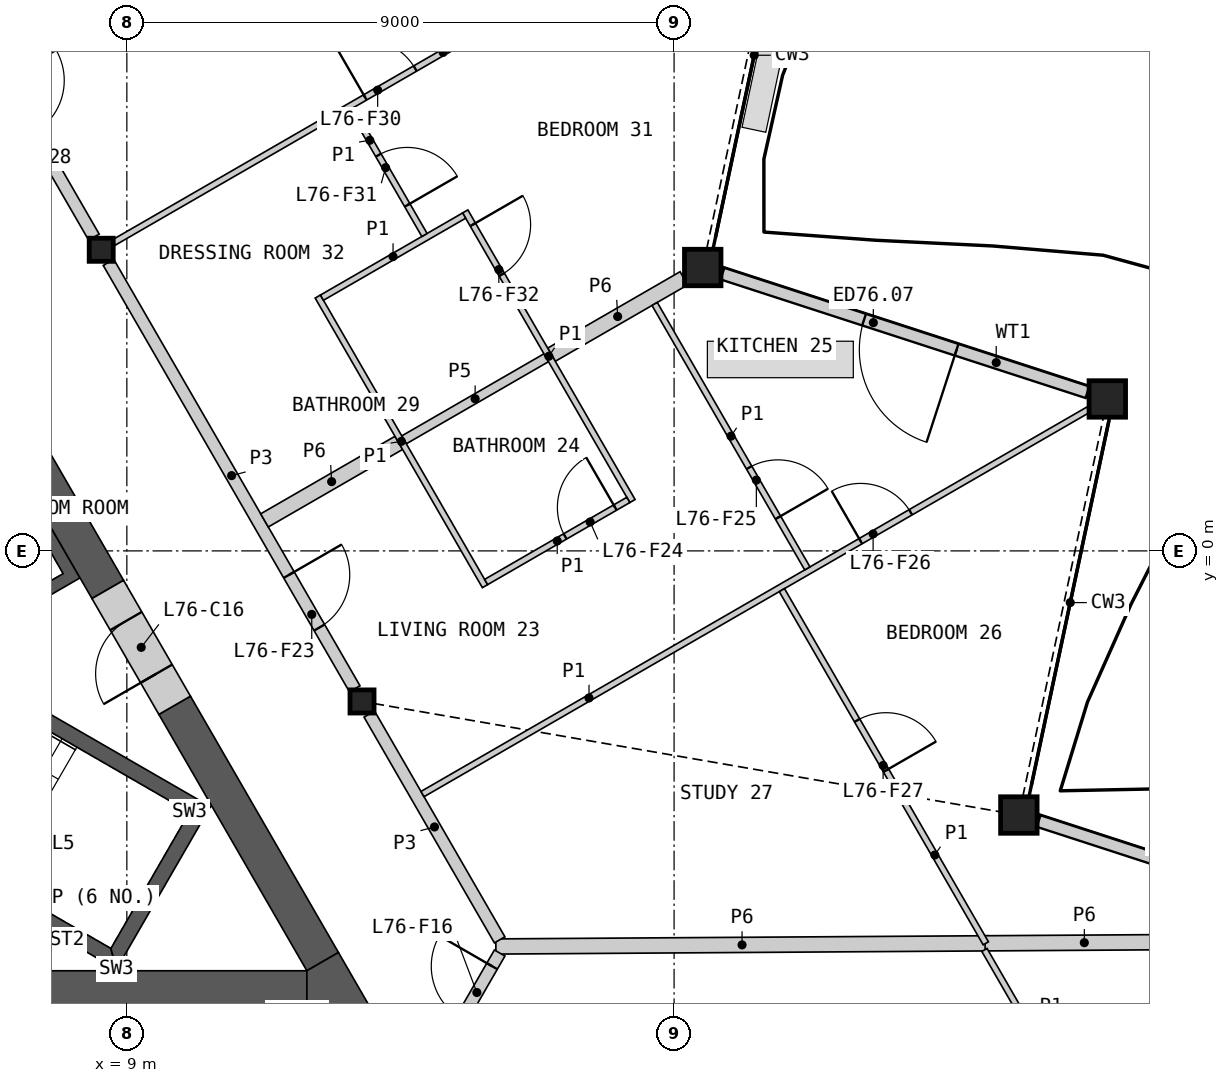
"""IFC4 building model, lengths in metres.
Left out: names, types, materials, properties, quantities, classifications, styles, units other than length and angle.
Written with IfcOpenShell. Run it as: python <this file> out.ifc"""

import sys

from ifc_helpers import new_model, si_unit, direction, frame, frame_2d, origin, origin_2d, place, context, subcontext, project, spatial, polyline, rectangle, hollow_rectangle, i_section, outline, extrude, element, fill, save


model = new_model("IFC4")
c1 = context("Model", 3, precision=1e-05, world=origin(), true_north=direction((0.0, 1.0)))
c2 = subcontext(c1, "Body", "Model", "MODEL_VIEW")
j1 = project(units=[si_unit("LENGTHUNIT", "METRE"), si_unit("PLANEANGLEUNIT", "RADIAN")], contexts=[c1])
p1 = place(None, origin())
s1 = spatial("IfcSite", under=j1, at=p1, CompositionType="ELEMENT")
p2 = place(p1, origin())
s2 = spatial("IfcBuilding", under=s1, at=p2, CompositionType="ELEMENT")
p3 = place(p2, frame((0.0, 0.0, 339.2)))
s3 = spatial("IfcBuildingStorey", under=s2, at=p3, CompositionType="ELEMENT", Elevation=339.2)
for number, where, z_axis, x_axis in (
    (1, (23.67, -4.344, 0.0), (0.0, 0.0, 1.0), (1.0, 0.0, 0.0)),
    (2, (25.125, 2.499, 0.0), (0.0, 0.0, 1.0), (1.0, 0.0, 0.0)),
    (3, (18.471, 4.661, 0.0), (0.0, 0.0, 1.0), (1.0, 0.0, 0.0)),
):
    element("IfcColumn", number, at=place(p3, frame(where, z_axis=z_axis, x_axis=x_axis)), inside=s3, PredefinedType="COLUMN", context=c2, shape_type="SweptSolid", body=[
        extrude(hollow_rectangle(XDim=0.6, YDim=0.6, WallThickness=0.04, at=origin_2d()), origin(), (0.0, 0.0, 1.0), 3.4),
    ])
for number, where, z_axis, x_axis in (
    (4, (12.868, -2.476, 0.0), (0.0, 0.0, 1.0), (1.0, 0.0, 0.0)),
    (5, (8.578, 4.953, 0.0), (0.0, 0.0, 1.0), (1.0, 0.0, 0.0)),
):
    element("IfcColumn", number, at=place(p3, frame(where, z_axis=z_axis, x_axis=x_axis)), inside=s3, PredefinedType="COLUMN", context=c2, shape_type="SweptSolid", body=[
        extrude(i_section(OverallWidth=0.396, OverallDepth=0.381, WebThickness=0.019, FlangeThickness=0.03, at=origin_2d()), origin(), (0.0, 0.0, 1.0), 3.4),
    ])
p4 = place(p3, frame((29.996, -6.393, 0.0), z_axis=(0.0, 0.0, 1.0), x_axis=(-0.951051127664, 0.309033578383, 0.0)))
e6 = element("IfcWall", 6, at=p4, inside=s3, PredefinedType="SOLIDWALL", context=c2, shape_type="SweptSolid", body=[
    extrude(rectangle(XDim=6.31, YDim=0.2, at=frame_2d((3.155, 0.0))), origin(), (0.0, 0.0, 1.0), 2.488),
])
p5 = place(p4, frame((2.263, 0.0, 0.0)))
e7 = element("IfcOpeningElement", 7, at=p5, cuts=e6, PredefinedType="OPENING", context=c2, shape_type="SweptSolid", body=[
    extrude(rectangle(XDim=1.6, YDim=2.25, at=frame_2d((0.8, 1.125))), frame((0.0, 0.11, 0.0), z_axis=(0.0, -1.0, 0.0), x_axis=(1.0, 0.0, 0.0)), (0.0, 0.0, 1.0), 0.22),
])
p6 = place(p3, frame((24.798, 2.609, 0.0), z_axis=(0.0, 0.0, 1.0), x_axis=(-0.951065616977, 0.308988983952, 0.0)))
e8 = element("IfcWall", 8, at=p6, inside=s3, PredefinedType="SOLIDWALL", context=c2, shape_type="SweptSolid", body=[
    extrude(rectangle(XDim=6.312, YDim=0.2, at=frame_2d((3.156, 0.0))), origin(), (0.0, 0.0, 1.0), 2.488),
])
p7 = place(p6, frame((2.263, 0.0, 0.0)))
e9 = element("IfcOpeningElement", 9, at=p7, cuts=e8, PredefinedType="OPENING", context=c2, shape_type="SweptSolid", body=[
    extrude(rectangle(XDim=1.6, YDim=2.25, at=frame_2d((0.8, 1.125))), frame((0.0, 0.11, 0.0), z_axis=(0.0, -1.0, 0.0), x_axis=(1.0, 0.0, 0.0)), (0.0, 0.0, 1.0), 0.22),
])
p8 = place(p3, origin())
e10 = element("IfcWall", 10, at=p8, inside=s3, PredefinedType="SHEAR", context=c2, shape_type="SweptSolid", body=[
    extrude(outline(polyline([(1.561, 6.097), (3.731, 7.35), (8.231, -0.444), (6.061, -1.697), (5.96, -1.524), (7.952, -0.374), (6.952, 1.358), (4.96, 0.208), (4.861, 0.381), (6.852, 1.531), (5.852, 3.263), (3.861, 2.113), (3.76, 2.287), (5.752, 3.437), (4.752, 5.169), (2.76, 4.019), (2.66, 4.192), (4.652, 5.342), (3.652, 7.074), (1.66, 5.924), (1.561, 6.097)])), origin(), (0.0, 0.0, 1.0), 3.1),
])
p9 = place(p3, origin())
e11 = element("IfcWall", 11, at=p9, inside=s3, PredefinedType="SHEAR", context=c2, shape_type="SweptSolid", body=[
    extrude(outline(polyline([(3.763, -3.956), (8.83, -6.881), (8.738, -6.539), (3.888, -3.739), (3.763, -3.956)])), origin(), (0.0, 0.0, 1.0), 3.1),
])
p10 = place(p3, origin())
e12 = element("IfcWall", 12, at=p10, inside=s3, PredefinedType="SHEAR", context=c2, shape_type="SweptSolid", body=[
    extrude(outline(polyline([(8.83, -6.881), (10.374, -4.206), (10.032, -4.298), (8.738, -6.539), (8.83, -6.881)])), origin(), (0.0, 0.0, 1.0), 3.1),
])
p11 = place(p3, origin())
e13 = element("IfcWall", 13, at=p11, inside=s3, PredefinedType="SHEAR", context=c2, shape_type="SweptSolid", body=[
    extrude(outline(polyline([(10.032, -4.298), (10.374, -4.206), (5.307, -1.281), (5.182, -1.498), (10.032, -4.298)])), origin(), (0.0, 0.0, 1.0), 3.1),
])
p12 = place(p3, frame((-11.961, -7.206, 0.0), z_axis=(0.0, 0.0, 1.0), x_axis=(1.0, 0.0, 0.0)))
e14 = element("IfcWall", 14, at=p12, inside=s3, PredefinedType="SHEAR", context=c2, shape_type="SweptSolid", body=[
    extrude(rectangle(XDim=23.921, YDim=0.6, at=frame_2d((11.961, 0.0))), origin(), (0.0, 0.0, 1.0), 3.1),
])
p13 = place(p3, frame((8.686, -0.634, 0.0), z_axis=(0.0, 0.0, 1.0), x_axis=(-0.50001836461, 0.866014800712, 0.0)))
e15 = element("IfcWall", 15, at=p13, inside=s3, PredefinedType="SHEAR", context=c2, shape_type="SweptSolid", body=[
    extrude(rectangle(XDim=10.451, YDim=0.6, at=frame_2d((5.225, 0.0))), origin(), (0.0, 0.0, 1.0), 3.1),
])
p14 = place(p3, frame((12.221, -6.756, 0.0), z_axis=(0.0, 0.0, 1.0), x_axis=(-0.50000604952, 0.866021911064, 0.0)))
e16 = element("IfcWall", 16, at=p14, inside=s3, PredefinedType="SHEAR", context=c2, shape_type="SweptSolid", body=[
    extrude(rectangle(XDim=4.869, YDim=0.6, at=frame_2d((2.434, 0.0))), origin(), (0.0, 0.0, 1.0), 3.1),
])
p15 = place(p3, origin())
e17 = element("IfcWall", 17, at=p15, inside=s3, PredefinedType="SHEAR", context=c2, shape_type="SweptSolid", body=[
    extrude(outline(polyline([(11.961, -7.506), (11.961, -6.906), (12.48, -6.606), (13.0, -7.506), (11.961, -7.506)])), origin(), (0.0, 0.0, 1.0), 3.1),
])
p16 = place(p3, frame((9.786, -2.539, 0.0), z_axis=(0.0, 0.0, 1.0), x_axis=(-0.499981787252, 0.866035918664, 0.0)))
e18 = element("IfcWall", 18, at=p16, inside=s3, PredefinedType="SHEAR", context=c2, shape_type="SweptSolid", body=[
    extrude(rectangle(XDim=2.2, YDim=0.6, at=frame_2d((1.1, 0.0))), origin(), (0.0, 0.0, 1.0), 3.1),
])
p17 = place(p16, frame((0.6, 0.0, 0.0)))
e19 = element("IfcOpeningElement", 19, at=p17, cuts=e18, PredefinedType="OPENING", context=c2, shape_type="SweptSolid", body=[
    extrude(rectangle(XDim=1.0, YDim=2.1, at=frame_2d((0.5, 1.05))), frame((0.0, 0.31, 0.0), z_axis=(0.0, -1.0, 0.0), x_axis=(1.0, 0.0, 0.0)), (0.0, 0.0, 1.0), 0.62),
])
p18 = place(p3, frame((4.409, 12.174, 0.0), z_axis=(0.0, 0.0, 1.0), x_axis=(0.499984266882, -0.866034487114, 0.0)))
e20 = element("IfcWall", 20, at=p18, inside=s3, PredefinedType="PARTITIONING", context=c2, shape_type="SweptSolid", body=[
    extrude(rectangle(XDim=8.099, YDim=0.2, at=frame_2d((4.049, 0.0))), origin(), (0.0, 0.0, 1.0), 3.1),
])
p19 = place(p18, frame((5.123, 0.0, 0.0)))
e21 = element("IfcOpeningElement", 21, at=p19, cuts=e20, PredefinedType="OPENING", context=c2, shape_type="SweptSolid", body=[
    extrude(rectangle(XDim=1.0, YDim=2.1, at=frame_2d((0.5, 1.05))), frame((0.0, 0.11, 0.0), z_axis=(0.0, -1.0, 0.0), x_axis=(1.0, 0.0, 0.0)), (0.0, 0.0, 1.0), 0.22),
])
p20 = place(p18, frame((1.164, 0.0, 0.0)))
e22 = element("IfcOpeningElement", 22, at=p20, cuts=e20, PredefinedType="OPENING", context=c2, shape_type="SweptSolid", body=[
    extrude(rectangle(XDim=1.0, YDim=2.1, at=frame_2d((0.5, 1.05))), frame((0.0, 0.11, 0.0), z_axis=(0.0, -1.0, 0.0), x_axis=(1.0, 0.0, 0.0)), (0.0, 0.0, 1.0), 0.22),
])
p21 = place(p3, frame((8.698, 4.745, 0.0), z_axis=(0.0, 0.0, 1.0), x_axis=(0.499984266882, -0.866034487114, 0.0)))
e23 = element("IfcWall", 23, at=p21, inside=s3, PredefinedType="PARTITIONING", context=c2, shape_type="SweptSolid", body=[
    extrude(rectangle(XDim=8.099, YDim=0.2, at=frame_2d((4.049, 0.0))), origin(), (0.0, 0.0, 1.0), 3.1),
])
p22 = place(p21, frame((5.935, 0.0, 0.0)))
e24 = element("IfcOpeningElement", 24, at=p22, cuts=e23, PredefinedType="OPENING", context=c2, shape_type="SweptSolid", body=[
    extrude(rectangle(XDim=1.0, YDim=2.1, at=frame_2d((0.5, 1.05))), frame((0.0, 0.11, 0.0), z_axis=(0.0, -1.0, 0.0), x_axis=(1.0, 0.0, 0.0)), (0.0, 0.0, 1.0), 0.22),
])
p23 = place(p3, frame((15.069, -6.506, 0.0), z_axis=(0.0, 0.0, 1.0), x_axis=(0.999979186485, 0.006451867641, 0.0)))
e25 = element("IfcWall", 25, at=p23, inside=s3, PredefinedType="PARTITIONING", context=c2, shape_type="SweptSolid", body=[
    extrude(rectangle(XDim=8.098, YDim=0.25, at=frame_2d((4.049, 0.0))), origin(), (0.0, 0.0, 1.0), 2.33),
])
p24 = place(p3, frame((23.115, -6.455, 0.0), z_axis=(0.0, 0.0, 1.0), x_axis=(0.999979299397, 0.006434343627, 0.0)))
e26 = element("IfcWall", 26, at=p24, inside=s3, PredefinedType="PARTITIONING", context=c2, shape_type="SweptSolid", body=[
    extrude(rectangle(XDim=6.526, YDim=0.25, at=frame_2d((3.263, 0.0))), origin(), (0.0, 0.0, 1.0), 2.33),
])
p25 = place(p3, frame((12.988, -2.684, 0.0), z_axis=(0.0, 0.0, 1.0), x_axis=(0.500003406062, -0.866023437285, 0.0)))
e27 = element("IfcWall", 27, at=p25, inside=s3, PredefinedType="PARTITIONING", context=c2, shape_type="SweptSolid", body=[
    extrude(rectangle(XDim=4.288, YDim=0.2, at=frame_2d((2.144, 0.0))), origin(), (0.0, 0.0, 1.0), 3.1),
])
p26 = place(p3, frame((13.293, -9.797, 0.0), z_axis=(0.0, 0.0, 1.0), x_axis=(0.499967746641, 0.866044024469, 0.0)))
e28 = element("IfcWall", 28, at=p26, inside=s3, PredefinedType="PARTITIONING", context=c2, shape_type="SweptSolid", body=[
    extrude(rectangle(XDim=3.676, YDim=0.2, at=frame_2d((1.838, 0.0))), origin(), (0.0, 0.0, 1.0), 3.1),
])
p27 = place(p26, frame((2.426, 0.0, 0.0)))
e29 = element("IfcOpeningElement", 29, at=p27, cuts=e28, PredefinedType="OPENING", context=c2, shape_type="SweptSolid", body=[
    extrude(rectangle(XDim=1.0, YDim=2.1, at=frame_2d((0.5, 1.05))), frame((0.0, 0.11, 0.0), z_axis=(0.0, -1.0, 0.0), x_axis=(1.0, 0.0, 0.0)), (0.0, 0.0, 1.0), 0.22),
])
p28 = place(p3, frame((11.264, 0.502, 0.0), z_axis=(0.0, 0.0, 1.0), x_axis=(0.866030925526, 0.499990435942, 0.0)))
e30 = element("IfcWall", 30, at=p28, inside=s3, PredefinedType="PARTITIONING", context=c2, shape_type="SweptSolid", body=[
    extrude(rectangle(XDim=2.55, YDim=0.25, at=frame_2d((1.275, 0.0))), origin(), (0.0, 0.0, 1.0), 2.33),
])
p29 = place(p3, frame((15.984, 3.227, 0.0), z_axis=(0.0, 0.0, 1.0), x_axis=(0.8660174017, 0.500013859761, 0.0)))
e31 = element("IfcWall", 31, at=p29, inside=s3, PredefinedType="PARTITIONING", context=c2, shape_type="SweptSolid", body=[
    extrude(rectangle(XDim=2.514, YDim=0.25, at=frame_2d((1.257, 0.0))), origin(), (0.0, 0.0, 1.0), 2.33),
])
p30 = place(p3, frame((13.559, 1.827, 0.0), z_axis=(0.0, 0.0, 1.0), x_axis=(0.866059108428, 0.4999416173, 0.0)))
e32 = element("IfcWall", 32, at=p30, inside=s3, PredefinedType="PLUMBINGWALL", context=c2, shape_type="SweptSolid", body=[
    extrude(rectangle(XDim=2.7, YDim=0.15, at=frame_2d((1.35, 0.0))), origin(), (0.0, 0.0, 1.0), 2.33),
])
p31 = place(p3, frame((13.863, -4.0, 0.0), z_axis=(0.0, 0.0, 1.0), x_axis=(0.866033203648, 0.499986489997, 0.0)))
e33 = element("IfcWall", 33, at=p31, inside=s3, PredefinedType="PARTITIONING", context=c2, shape_type="SweptSolid", body=[
    extrude(rectangle(XDim=12.646, YDim=0.1, at=frame_2d((6.323, 0.0))), origin(), (0.0, 0.0, 1.0), 2.33),
])
p32 = place(p31, frame((8.319, 0.0, 0.0)))
e34 = element("IfcOpeningElement", 34, at=p32, cuts=e33, PredefinedType="OPENING", context=c2, shape_type="SweptSolid", body=[
    extrude(rectangle(XDim=0.95, YDim=2.1, at=frame_2d((0.475, 1.05))), frame((0.0, 0.06, 0.0), z_axis=(0.0, -1.0, 0.0), x_axis=(1.0, 0.0, 0.0)), (0.0, 0.0, 1.0), 0.12),
])
p33 = place(p3, frame((8.786, 5.073, 0.0), z_axis=(0.0, 0.0, 1.0), x_axis=(0.86602139559, 0.500006942333, 0.0)))
e35 = element("IfcWall", 35, at=p33, inside=s3, PredefinedType="PARTITIONING", context=c2, shape_type="SweptSolid", body=[
    extrude(rectangle(XDim=12.505, YDim=0.1, at=frame_2d((6.252, 0.0))), origin(), (0.0, 0.0, 1.0), 2.33),
])
p34 = place(p33, frame((4.772, 0.0, 0.0)))
e36 = element("IfcOpeningElement", 36, at=p34, cuts=e35, PredefinedType="OPENING", context=c2, shape_type="SweptSolid", body=[
    extrude(rectangle(XDim=0.95, YDim=2.1, at=frame_2d((0.475, 1.05))), frame((0.0, 0.06, 0.0), z_axis=(0.0, -1.0, 0.0), x_axis=(1.0, 0.0, 0.0)), (0.0, 0.0, 1.0), 0.12),
])
p35 = place(p3, frame((23.331, -13.412, 0.0), z_axis=(0.0, 0.0, 1.0), x_axis=(0.499994510044, 0.866028573389, 0.0)))
e37 = element("IfcWall", 37, at=p35, inside=s3, PredefinedType="PARTITIONING", context=c2, shape_type="SweptSolid", body=[
    extrude(rectangle(XDim=7.975, YDim=0.1, at=frame_2d((3.988, 0.0))), origin(), (0.0, 0.0, 1.0), 2.33),
])
p36 = place(p35, frame((1.957, 0.0, 0.0)))
e38 = element("IfcOpeningElement", 38, at=p36, cuts=e37, PredefinedType="OPENING", context=c2, shape_type="SweptSolid", body=[
    extrude(rectangle(XDim=0.95, YDim=2.1, at=frame_2d((0.475, 1.05))), frame((0.0, 0.06, 0.0), z_axis=(0.0, -1.0, 0.0), x_axis=(1.0, 0.0, 0.0)), (0.0, 0.0, 1.0), 0.12),
])
p37 = place(p3, frame((19.773, -0.645, 0.0), z_axis=(0.0, 0.0, 1.0), x_axis=(0.499998644583, -0.866026186333, 0.0)))
e39 = element("IfcWall", 39, at=p37, inside=s3, PredefinedType="PARTITIONING", context=c2, shape_type="SweptSolid", body=[
    extrude(rectangle(XDim=6.708, YDim=0.1, at=frame_2d((3.354, 0.0))), origin(), (0.0, 0.0, 1.0), 2.33),
])
p38 = place(p37, frame((2.475, 0.0, 0.0)))
e40 = element("IfcOpeningElement", 40, at=p38, cuts=e39, PredefinedType="OPENING", context=c2, shape_type="SweptSolid", body=[
    extrude(rectangle(XDim=0.95, YDim=2.1, at=frame_2d((0.475, 1.05))), frame((0.0, 0.06, 0.0), z_axis=(0.0, -1.0, 0.0), x_axis=(1.0, 0.0, 0.0)), (0.0, 0.0, 1.0), 0.12),
])
p39 = place(p3, frame((14.565, 5.583, 0.0), z_axis=(0.0, 0.0, 1.0), x_axis=(0.499996545922, -0.866027397988, 0.0)))
e41 = element("IfcWall", 41, at=p39, inside=s3, PredefinedType="PARTITIONING", context=c2, shape_type="SweptSolid", body=[
    extrude(rectangle(XDim=5.5, YDim=0.1, at=frame_2d((2.75, 0.0))), origin(), (0.0, 0.0, 1.0), 2.33),
])
p40 = place(p39, frame((0.25, 0.0, 0.0)))
e42 = element("IfcOpeningElement", 42, at=p40, cuts=e41, PredefinedType="OPENING", context=c2, shape_type="SweptSolid", body=[
    extrude(rectangle(XDim=0.95, YDim=2.1, at=frame_2d((0.475, 1.05))), frame((0.0, 0.06, 0.0), z_axis=(0.0, -1.0, 0.0), x_axis=(1.0, 0.0, 0.0)), (0.0, 0.0, 1.0), 0.12),
])
p41 = place(p3, frame((12.14, 4.183, 0.0), z_axis=(0.0, 0.0, 1.0), x_axis=(0.499996545922, -0.866027397988, 0.0)))
e43 = element("IfcWall", 43, at=p41, inside=s3, PredefinedType="PARTITIONING", context=c2, shape_type="SweptSolid", body=[
    extrude(rectangle(XDim=5.5, YDim=0.1, at=frame_2d((2.75, 0.0))), origin(), (0.0, 0.0, 1.0), 2.33),
])
p42 = place(p3, frame((17.68, 4.062, 0.0), z_axis=(0.0, 0.0, 1.0), x_axis=(0.499997360652, -0.866026927608, 0.0)))
e44 = element("IfcWall", 44, at=p42, inside=s3, PredefinedType="PARTITIONING", context=c2, shape_type="SweptSolid", body=[
    extrude(rectangle(XDim=5.022, YDim=0.1, at=frame_2d((2.511, 0.0))), origin(), (0.0, 0.0, 1.0), 2.33),
])
p43 = place(p42, frame((3.108, 0.0, 0.0)))
e45 = element("IfcOpeningElement", 45, at=p43, cuts=e44, PredefinedType="OPENING", context=c2, shape_type="SweptSolid", body=[
    extrude(rectangle(XDim=0.95, YDim=2.1, at=frame_2d((0.475, 1.05))), frame((0.0, 0.06, 0.0), z_axis=(0.0, -1.0, 0.0), x_axis=(1.0, 0.0, 0.0)), (0.0, 0.0, 1.0), 0.12),
])
p44 = place(p3, frame((23.104, -6.563, 0.0), z_axis=(0.0, 0.0, 1.0), x_axis=(0.499999078476, -0.866025935826, 0.0)))
e46 = element("IfcWall", 46, at=p44, inside=s3, PredefinedType="PARTITIONING", context=c2, shape_type="SweptSolid", body=[
    extrude(rectangle(XDim=2.979, YDim=0.1, at=frame_2d((1.49, 0.0))), origin(), (0.0, 0.0, 1.0), 2.33),
])
p45 = place(p3, frame((14.909, -0.512, 0.0), z_axis=(0.0, 0.0, 1.0), x_axis=(0.866019956843, 0.50000943426, 0.0)))
e47 = element("IfcWall", 47, at=p45, inside=s3, PredefinedType="PARTITIONING", context=c2, shape_type="SweptSolid", body=[
    extrude(rectangle(XDim=2.7, YDim=0.1, at=frame_2d((1.35, 0.0))), origin(), (0.0, 0.0, 1.0), 2.33),
])
p46 = place(p45, frame((1.5, 0.0, 0.0)))
e48 = element("IfcOpeningElement", 48, at=p46, cuts=e47, PredefinedType="OPENING", context=c2, shape_type="SweptSolid", body=[
    extrude(rectangle(XDim=0.95, YDim=2.1, at=frame_2d((0.475, 1.05))), frame((0.0, 0.06, 0.0), z_axis=(0.0, -1.0, 0.0), x_axis=(1.0, 0.0, 0.0)), (0.0, 0.0, 1.0), 0.12),
])
p47 = place(p3, frame((12.209, 4.165, 0.0), z_axis=(0.0, 0.0, 1.0), x_axis=(0.866019956843, 0.50000943426, 0.0)))
e49 = element("IfcWall", 49, at=p47, inside=s3, PredefinedType="PARTITIONING", context=c2, shape_type="SweptSolid", body=[
    extrude(rectangle(XDim=2.7, YDim=0.1, at=frame_2d((1.35, 0.0))), origin(), (0.0, 0.0, 1.0), 2.33),
])
p48 = place(p3, frame((12.696, 7.272, 0.0), z_axis=(0.0, 0.0, 1.0), x_axis=(0.500016292001, -0.866015997389, 0.0)))
e50 = element("IfcWall", 50, at=p48, inside=s3, PredefinedType="PARTITIONING", context=c2, shape_type="SweptSolid", body=[
    extrude(rectangle(XDim=2.397, YDim=0.1, at=frame_2d((1.199, 0.0))), origin(), (0.0, 0.0, 1.0), 2.33),
])
p49 = place(p48, frame((0.882, 0.0, 0.0)))
e51 = element("IfcOpeningElement", 51, at=p49, cuts=e50, PredefinedType="OPENING", context=c2, shape_type="SweptSolid", body=[
    extrude(rectangle(XDim=0.95, YDim=2.1, at=frame_2d((0.475, 1.05))), frame((0.0, 0.06, 0.0), z_axis=(0.0, -1.0, 0.0), x_axis=(1.0, 0.0, 0.0)), (0.0, 0.0, 1.0), 0.12),
])
p50 = place(p7, origin())
e52 = element("IfcDoor", 52, at=p50, inside=s3, OperationType="DOUBLE_DOOR_SINGLE_SWING", PredefinedType="DOOR", context=c2, shape_type="SweptSolid", body=[
    extrude(rectangle(XDim=1.6, YDim=2.25, at=frame_2d((0.8, 1.125))), frame((0.0, 0.025, 0.0), z_axis=(0.0, -1.0, 0.0), x_axis=(1.0, 0.0, 0.0)), (0.0, 0.0, 1.0), 0.05),
])
fill(e9, e52)
p51 = place(p17, origin())
e53 = element("IfcDoor", 53, at=p51, inside=s3, OperationType="SINGLE_SWING_LEFT", PredefinedType="DOOR", context=c2, shape_type="SweptSolid", body=[
    extrude(rectangle(XDim=1.0, YDim=2.1, at=frame_2d((0.5, 1.05))), frame((0.0, 0.055, 0.0), z_axis=(0.0, -1.0, 0.0), x_axis=(1.0, 0.0, 0.0)), (0.0, 0.0, 1.0), 0.05),
])
fill(e19, e53)
p52 = place(p27, origin())
e54 = element("IfcDoor", 54, at=p52, inside=s3, OperationType="SINGLE_SWING_RIGHT", PredefinedType="DOOR", context=c2, shape_type="SweptSolid", body=[
    extrude(rectangle(XDim=1.0, YDim=2.1, at=frame_2d((0.5, 1.05))), frame((0.0, 0.025, 0.0), z_axis=(0.0, -1.0, 0.0), x_axis=(1.0, 0.0, 0.0)), (0.0, 0.0, 1.0), 0.05),
])
fill(e29, e54)
p53 = place(p22, origin())
e55 = element("IfcDoor", 55, at=p53, inside=s3, OperationType="SINGLE_SWING_LEFT", PredefinedType="DOOR", context=c2, shape_type="SweptSolid", body=[
    extrude(rectangle(XDim=1.0, YDim=2.1, at=frame_2d((0.5, 1.05))), frame((0.0, 0.025, 0.0), z_axis=(0.0, -1.0, 0.0), x_axis=(1.0, 0.0, 0.0)), (0.0, 0.0, 1.0), 0.05),
])
fill(e24, e55)
p54 = place(p46, origin())
e56 = element("IfcDoor", 56, at=p54, inside=s3, OperationType="SINGLE_SWING_RIGHT", PredefinedType="DOOR", context=c2, shape_type="SweptSolid", body=[
    extrude(rectangle(XDim=0.95, YDim=2.1, at=frame_2d((0.475, 1.05))), frame((0.0, 0.025, 0.0), z_axis=(0.0, -1.0, 0.0), x_axis=(1.0, 0.0, 0.0)), (0.0, 0.0, 1.0), 0.05),
])
fill(e48, e56)
p55 = place(p43, origin())
e57 = element("IfcDoor", 57, at=p55, inside=s3, OperationType="SINGLE_SWING_RIGHT", PredefinedType="DOOR", context=c2, shape_type="SweptSolid", body=[
    extrude(rectangle(XDim=0.95, YDim=2.1, at=frame_2d((0.475, 1.05))), frame((0.0, 0.025, 0.0), z_axis=(0.0, -1.0, 0.0), x_axis=(1.0, 0.0, 0.0)), (0.0, 0.0, 1.0), 0.05),
])
fill(e45, e57)
p56 = place(p32, origin())
e58 = element("IfcDoor", 58, at=p56, inside=s3, OperationType="SINGLE_SWING_LEFT", PredefinedType="DOOR", context=c2, shape_type="SweptSolid", body=[
    extrude(rectangle(XDim=0.95, YDim=2.1, at=frame_2d((0.475, 1.05))), frame((0.0, 0.025, 0.0), z_axis=(0.0, -1.0, 0.0), x_axis=(1.0, 0.0, 0.0)), (0.0, 0.0, 1.0), 0.05),
])
fill(e34, e58)
p57 = place(p38, origin())
e59 = element("IfcDoor", 59, at=p57, inside=s3, OperationType="SINGLE_SWING_RIGHT", PredefinedType="DOOR", context=c2, shape_type="SweptSolid", body=[
    extrude(rectangle(XDim=0.95, YDim=2.1, at=frame_2d((0.475, 1.05))), frame((0.0, 0.025, 0.0), z_axis=(0.0, -1.0, 0.0), x_axis=(1.0, 0.0, 0.0)), (0.0, 0.0, 1.0), 0.05),
])
fill(e40, e59)
p58 = place(p34, origin())
e60 = element("IfcDoor", 60, at=p58, inside=s3, OperationType="SINGLE_SWING_LEFT", PredefinedType="DOOR", context=c2, shape_type="SweptSolid", body=[
    extrude(rectangle(XDim=0.95, YDim=2.1, at=frame_2d((0.475, 1.05))), frame((0.0, 0.025, 0.0), z_axis=(0.0, -1.0, 0.0), x_axis=(1.0, 0.0, 0.0)), (0.0, 0.0, 1.0), 0.05),
])
fill(e36, e60)
p59 = place(p49, origin())
e61 = element("IfcDoor", 61, at=p59, inside=s3, OperationType="SINGLE_SWING_RIGHT", PredefinedType="DOOR", context=c2, shape_type="SweptSolid", body=[
    extrude(rectangle(XDim=0.95, YDim=2.1, at=frame_2d((0.475, 1.05))), frame((0.0, 0.025, 0.0), z_axis=(0.0, -1.0, 0.0), x_axis=(1.0, 0.0, 0.0)), (0.0, 0.0, 1.0), 0.05),
])
fill(e51, e61)
p60 = place(p40, origin())
e62 = element("IfcDoor", 62, at=p60, inside=s3, OperationType="SINGLE_SWING_LEFT", PredefinedType="DOOR", context=c2, shape_type="SweptSolid", body=[
    extrude(rectangle(XDim=0.95, YDim=2.1, at=frame_2d((0.475, 1.05))), frame((0.0, 0.025, 0.0), z_axis=(0.0, -1.0, 0.0), x_axis=(1.0, 0.0, 0.0)), (0.0, 0.0, 1.0), 0.05),
])
fill(e42, e62)
save(model, sys.argv[1])
